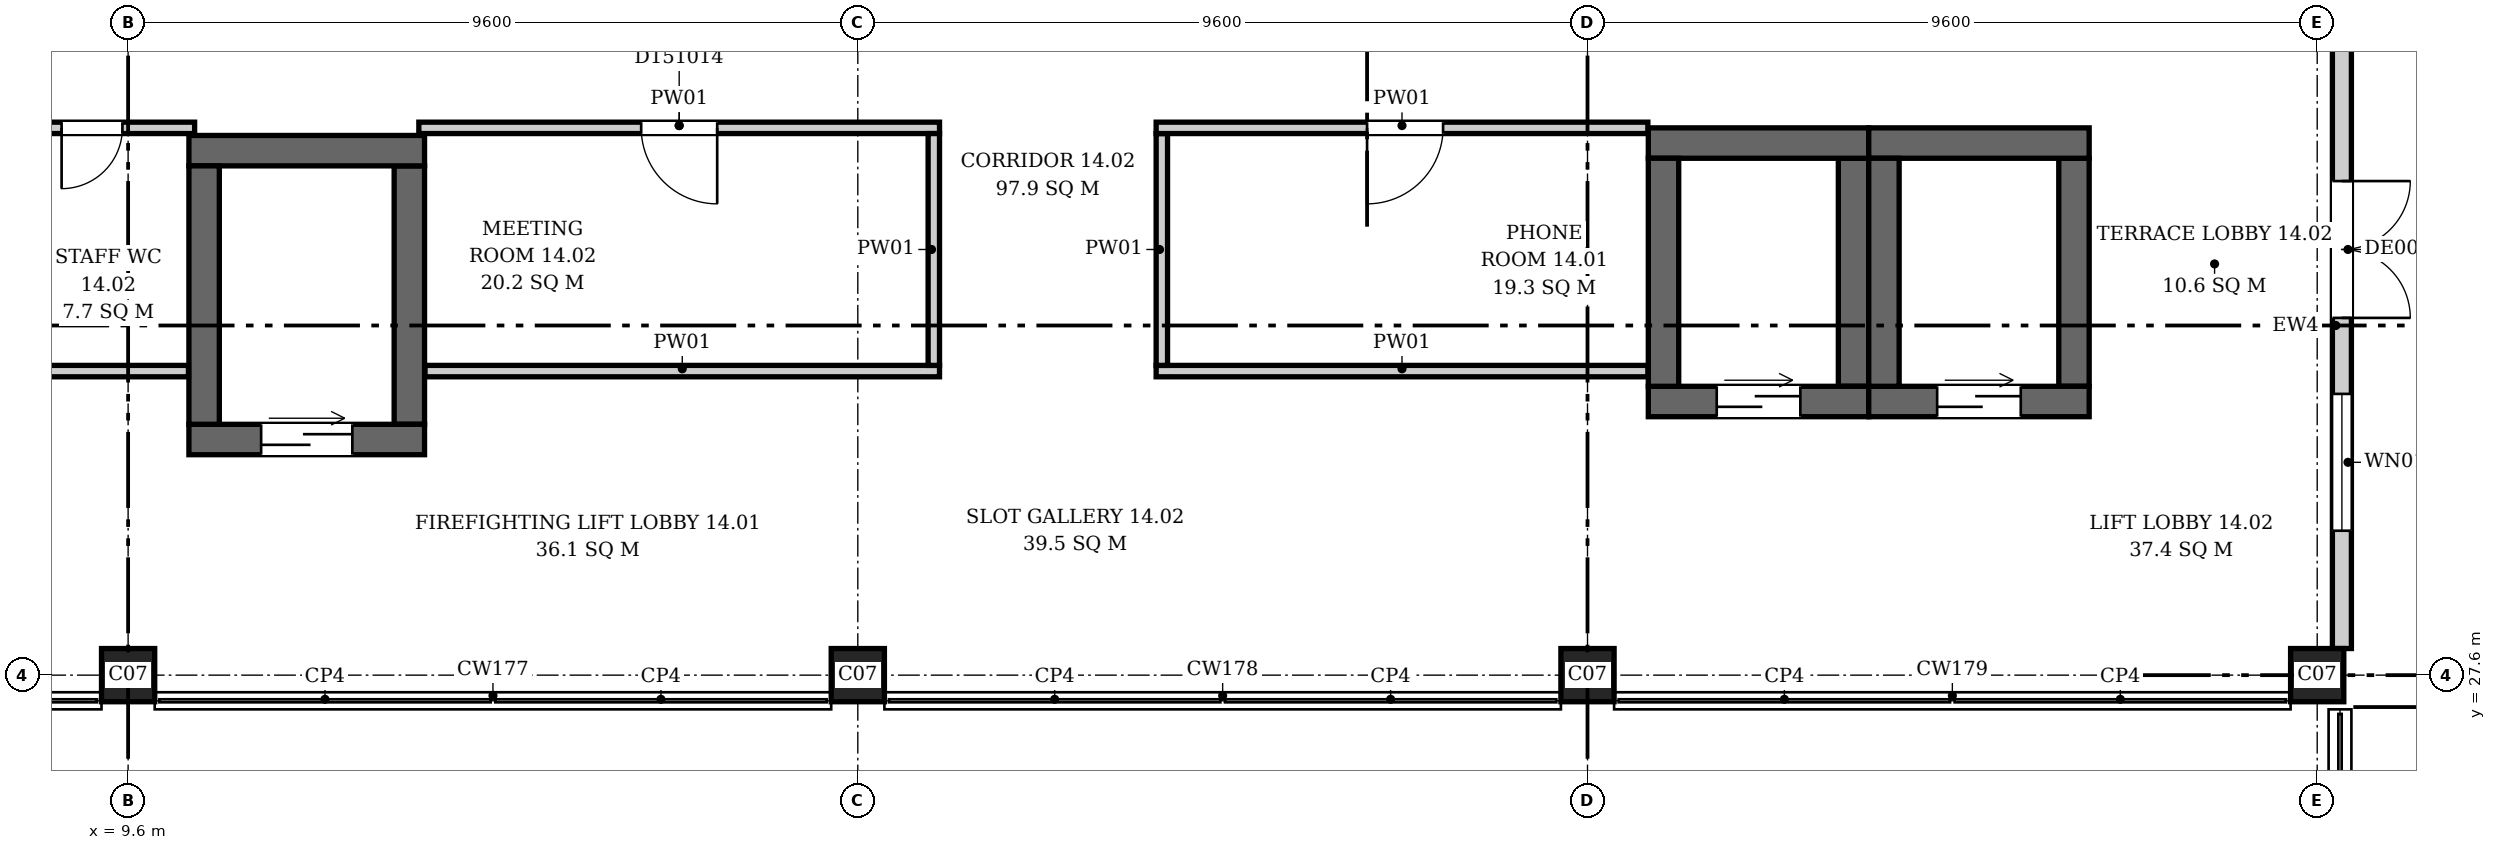
"""IFC4 building model, lengths in metres.
Left out: names, types, materials, properties, quantities, classifications, styles, units other than length and angle.
Written with IfcOpenShell. Run it as: python <this file> out.ifc"""

import sys

from ifc_helpers import new_model, si_unit, direction, frame, frame_2d, origin, origin_2d, place, context, subcontext, project, spatial, rectangle, extrude, element, fill, save


model = new_model("IFC4")
c1 = context("Model", 3, precision=1e-05, world=origin(), true_north=direction((0.0, 1.0)))
c2 = subcontext(c1, "Body", "Model", "MODEL_VIEW")
j1 = project(units=[si_unit("LENGTHUNIT", "METRE"), si_unit("PLANEANGLEUNIT", "RADIAN")], contexts=[c1])
p1 = place(None, origin())
s1 = spatial("IfcSite", under=j1, at=p1, CompositionType="ELEMENT")
p2 = place(p1, origin())
s2 = spatial("IfcBuilding", under=s1, at=p2, CompositionType="ELEMENT")
p3 = place(p2, frame((0.0, 0.0, 69.7)))
s3 = spatial("IfcBuildingStorey", under=s2, at=p3, CompositionType="ELEMENT", Elevation=69.7)
p4 = place(p3, frame((10.4, 30.7, 0.0), z_axis=(0.0, 0.0, 1.0), x_axis=(1.0, 0.0, 0.0)))
e1 = element("IfcWall", 1, at=p4, inside=s3, PredefinedType="SHEAR", context=c2, shape_type="SweptSolid", body=[
    extrude(rectangle(XDim=3.1, YDim=0.4, at=frame_2d((1.55, 0.0))), origin(), (0.0, 0.0, 1.0), 4.2),
])
p5 = place(p4, frame((0.95, 0.0, 0.0)))
e2 = element("IfcOpeningElement", 2, at=p5, cuts=e1, PredefinedType="OPENING", context=c2, shape_type="SweptSolid", body=[
    extrude(rectangle(XDim=1.2, YDim=2.1, at=frame_2d((0.6, 1.05))), frame((0.0, 0.21, 0.0), z_axis=(0.0, -1.0, 0.0), x_axis=(1.0, 0.0, 0.0)), (0.0, 0.0, 1.0), 0.42),
])
p6 = place(p3, frame((10.4, 34.5, 0.0), z_axis=(0.0, 0.0, 1.0), x_axis=(1.0, 0.0, 0.0)))
e3 = element("IfcWall", 3, at=p6, inside=s3, PredefinedType="SHEAR", context=c2, shape_type="SweptSolid", body=[
    extrude(rectangle(XDim=3.1, YDim=0.4, at=frame_2d((1.55, 0.0))), origin(), (0.0, 0.0, 1.0), 4.2),
])
for number, where, z_axis, x_axis in (
    (4, (10.6, 30.9, 0.0), (0.0, 0.0, 1.0), (0.0, 1.0, 0.0)),
    (5, (13.3, 30.9, 0.0), (0.0, 0.0, 1.0), (0.0, 1.0, 0.0)),
):
    element("IfcWall", number, at=place(p3, frame(where, z_axis=z_axis, x_axis=x_axis)), inside=s3, PredefinedType="SHEAR", context=c2, shape_type="SweptSolid", body=[
        extrude(rectangle(XDim=3.4, YDim=0.4, at=frame_2d((1.7, 0.0))), origin(), (0.0, 0.0, 1.0), 4.2),
    ])
p7 = place(p3, frame((29.6, 31.2, 0.0), z_axis=(0.0, 0.0, 1.0), x_axis=(1.0, 0.0, 0.0)))
e6 = element("IfcWall", 6, at=p7, inside=s3, PredefinedType="SHEAR", context=c2, shape_type="SweptSolid", body=[
    extrude(rectangle(XDim=2.9, YDim=0.4, at=frame_2d((1.45, 0.0))), origin(), (0.0, 0.0, 1.0), 4.2),
])
p8 = place(p7, frame((0.9, 0.0, 0.0)))
e7 = element("IfcOpeningElement", 7, at=p8, cuts=e6, PredefinedType="OPENING", context=c2, shape_type="SweptSolid", body=[
    extrude(rectangle(XDim=1.1, YDim=2.1, at=frame_2d((0.55, 1.05))), frame((0.0, 0.21, 0.0), z_axis=(0.0, -1.0, 0.0), x_axis=(1.0, 0.0, 0.0)), (0.0, 0.0, 1.0), 0.42),
])
p9 = place(p3, frame((29.6, 34.6, 0.0), z_axis=(0.0, 0.0, 1.0), x_axis=(1.0, 0.0, 0.0)))
e8 = element("IfcWall", 8, at=p9, inside=s3, PredefinedType="SHEAR", context=c2, shape_type="SweptSolid", body=[
    extrude(rectangle(XDim=2.9, YDim=0.4, at=frame_2d((1.45, 0.0))), origin(), (0.0, 0.0, 1.0), 4.2),
])
for number, where, z_axis, x_axis in (
    (9, (29.8, 31.4, 0.0), (0.0, 0.0, 1.0), (0.0, 1.0, 0.0)),
    (10, (32.3, 31.4, 0.0), (0.0, 0.0, 1.0), (0.0, 1.0, 0.0)),
):
    element("IfcWall", number, at=place(p3, frame(where, z_axis=z_axis, x_axis=x_axis)), inside=s3, PredefinedType="SHEAR", context=c2, shape_type="SweptSolid", body=[
        extrude(rectangle(XDim=3.0, YDim=0.4, at=frame_2d((1.5, 0.0))), origin(), (0.0, 0.0, 1.0), 4.2),
    ])
p10 = place(p3, frame((32.5, 31.2, 0.0), z_axis=(0.0, 0.0, 1.0), x_axis=(1.0, 0.0, 0.0)))
e11 = element("IfcWall", 11, at=p10, inside=s3, PredefinedType="SHEAR", context=c2, shape_type="SweptSolid", body=[
    extrude(rectangle(XDim=2.9, YDim=0.4, at=frame_2d((1.45, 0.0))), origin(), (0.0, 0.0, 1.0), 4.2),
])
p11 = place(p10, frame((0.9, 0.0, 0.0)))
e12 = element("IfcOpeningElement", 12, at=p11, cuts=e11, PredefinedType="OPENING", context=c2, shape_type="SweptSolid", body=[
    extrude(rectangle(XDim=1.1, YDim=2.1, at=frame_2d((0.55, 1.05))), frame((0.0, 0.21, 0.0), z_axis=(0.0, -1.0, 0.0), x_axis=(1.0, 0.0, 0.0)), (0.0, 0.0, 1.0), 0.42),
])
p12 = place(p3, frame((32.5, 34.6, 0.0), z_axis=(0.0, 0.0, 1.0), x_axis=(1.0, 0.0, 0.0)))
e13 = element("IfcWall", 13, at=p12, inside=s3, PredefinedType="SHEAR", context=c2, shape_type="SweptSolid", body=[
    extrude(rectangle(XDim=2.9, YDim=0.4, at=frame_2d((1.45, 0.0))), origin(), (0.0, 0.0, 1.0), 4.2),
])
for number, where, z_axis, x_axis in (
    (14, (32.7, 31.4, 0.0), (0.0, 0.0, 1.0), (0.0, 1.0, 0.0)),
    (15, (35.2, 31.4, 0.0), (0.0, 0.0, 1.0), (0.0, 1.0, 0.0)),
):
    element("IfcWall", number, at=place(p3, frame(where, z_axis=z_axis, x_axis=x_axis)), inside=s3, PredefinedType="SHEAR", context=c2, shape_type="SweptSolid", body=[
        extrude(rectangle(XDim=3.0, YDim=0.4, at=frame_2d((1.5, 0.0))), origin(), (0.0, 0.0, 1.0), 4.2),
    ])
for number, where, z_axis, x_axis in (
    (16, (9.6, 27.6, 0.0), (0.0, 0.0, 1.0), (1.0, 0.0, 0.0)),
    (17, (19.2, 27.6, 0.0), (0.0, 0.0, 1.0), (1.0, 0.0, 0.0)),
    (18, (28.8, 27.6, 0.0), (0.0, 0.0, 1.0), (1.0, 0.0, 0.0)),
    (19, (38.4, 27.6, 0.0), (0.0, 0.0, 1.0), (1.0, 0.0, 0.0)),
):
    element("IfcColumn", number, at=place(p3, frame(where, z_axis=z_axis, x_axis=x_axis)), inside=s3, PredefinedType="COLUMN", context=c2, shape_type="SweptSolid", body=[
        extrude(rectangle(XDim=0.7, YDim=0.7, at=origin_2d()), origin(), (0.0, 0.0, 1.0), 4.2),
    ])
p13 = place(p3, frame((38.725, 27.95, 0.0), z_axis=(0.0, 0.0, 1.0), x_axis=(0.0, 1.0, 0.0)))
e20 = element("IfcWall", 20, at=p13, inside=s3, PredefinedType="ELEMENTEDWALL", context=c2, shape_type="SweptSolid", body=[
    extrude(rectangle(XDim=8.5, YDim=0.25, at=frame_2d((4.25, 0.0))), origin(), (0.0, 0.0, 1.0), 3.9),
])
p14 = place(p13, frame((4.35, 0.0, 0.0)))
e21 = element("IfcOpeningElement", 21, at=p14, cuts=e20, PredefinedType="OPENING", context=c2, shape_type="SweptSolid", body=[
    extrude(rectangle(XDim=1.8, YDim=2.4, at=frame_2d((0.9, 1.2))), frame((0.0, 0.135, 0.0), z_axis=(0.0, -1.0, 0.0), x_axis=(1.0, 0.0, 0.0)), (0.0, 0.0, 1.0), 0.27),
])
p15 = place(p13, frame((1.55, 0.0, 0.9)))
e22 = element("IfcOpeningElement", 22, at=p15, cuts=e20, PredefinedType="OPENING", context=c2, shape_type="SweptSolid", body=[
    extrude(rectangle(XDim=1.8, YDim=2.6, at=frame_2d((0.9, 1.3))), frame((0.0, 0.135, 0.0), z_axis=(0.0, -1.0, 0.0), x_axis=(1.0, 0.0, 0.0)), (0.0, 0.0, 1.0), 0.27),
])
p16 = place(p3, frame((-0.044, 31.6, 0.0), z_axis=(0.0, 0.0, 1.0), x_axis=(1.0, 0.0, 0.0)))
e23 = element("IfcWall", 23, at=p16, inside=s3, PredefinedType="PARTITIONING", context=c2, shape_type="SweptSolid", body=[
    extrude(rectangle(XDim=10.438, YDim=0.15, at=frame_2d((5.219, 0.0))), origin(), (0.0, 0.0, 1.0), 3.9),
])
p17 = place(p3, frame((-0.044, 34.8, 0.0), z_axis=(0.0, 0.0, 1.0), x_axis=(1.0, 0.0, 0.0)))
e24 = element("IfcWall", 24, at=p17, inside=s3, PredefinedType="PARTITIONING", context=c2, shape_type="SweptSolid", body=[
    extrude(rectangle(XDim=10.519, YDim=0.15, at=frame_2d((5.26, 0.0))), origin(), (0.0, 0.0, 1.0), 3.9),
])
p18 = place(p17, frame((0.844, 0.0, 0.0)))
e25 = element("IfcOpeningElement", 25, at=p18, cuts=e24, PredefinedType="OPENING", context=c2, shape_type="SweptSolid", body=[
    extrude(rectangle(XDim=0.9, YDim=2.1, at=frame_2d((0.45, 1.05))), frame((0.0, 0.085, 0.0), z_axis=(0.0, -1.0, 0.0), x_axis=(1.0, 0.0, 0.0)), (0.0, 0.0, 1.0), 0.17),
])
p19 = place(p17, frame((3.469, 0.0, 0.0)))
e26 = element("IfcOpeningElement", 26, at=p19, cuts=e24, PredefinedType="OPENING", context=c2, shape_type="SweptSolid", body=[
    extrude(rectangle(XDim=0.8, YDim=2.1, at=frame_2d((0.4, 1.05))), frame((0.0, 0.085, 0.0), z_axis=(0.0, -1.0, 0.0), x_axis=(1.0, 0.0, 0.0)), (0.0, 0.0, 1.0), 0.17),
])
p20 = place(p17, frame((6.143, 0.0, 0.0)))
e27 = element("IfcOpeningElement", 27, at=p20, cuts=e24, PredefinedType="OPENING", context=c2, shape_type="SweptSolid", body=[
    extrude(rectangle(XDim=0.7, YDim=2.1, at=frame_2d((0.35, 1.05))), frame((0.0, 0.085, 0.0), z_axis=(0.0, -1.0, 0.0), x_axis=(1.0, 0.0, 0.0)), (0.0, 0.0, 1.0), 0.17),
])
p21 = place(p17, frame((8.769, 0.0, 0.0)))
e28 = element("IfcOpeningElement", 28, at=p21, cuts=e24, PredefinedType="OPENING", context=c2, shape_type="SweptSolid", body=[
    extrude(rectangle(XDim=0.8, YDim=2.1, at=frame_2d((0.4, 1.05))), frame((0.0, 0.085, 0.0), z_axis=(0.0, -1.0, 0.0), x_axis=(1.0, 0.0, 0.0)), (0.0, 0.0, 1.0), 0.17),
])
p22 = place(p3, frame((13.425, 34.8, 0.0), z_axis=(0.0, 0.0, 1.0), x_axis=(1.0, 0.0, 0.0)))
e29 = element("IfcWall", 29, at=p22, inside=s3, PredefinedType="PARTITIONING", context=c2, shape_type="SweptSolid", body=[
    extrude(rectangle(XDim=6.85, YDim=0.15, at=frame_2d((3.425, 0.0))), origin(), (0.0, 0.0, 1.0), 3.9),
])
p23 = place(p22, frame((2.925, 0.0, 0.0)))
e30 = element("IfcOpeningElement", 30, at=p23, cuts=e29, PredefinedType="OPENING", context=c2, shape_type="SweptSolid", body=[
    extrude(rectangle(XDim=1.0, YDim=2.1, at=frame_2d((0.5, 1.05))), frame((0.0, 0.085, 0.0), z_axis=(0.0, -1.0, 0.0), x_axis=(1.0, 0.0, 0.0)), (0.0, 0.0, 1.0), 0.17),
])
p24 = place(p3, frame((13.506, 31.6, 0.0), z_axis=(0.0, 0.0, 1.0), x_axis=(1.0, 0.0, 0.0)))
e31 = element("IfcWall", 31, at=p24, inside=s3, PredefinedType="PARTITIONING", context=c2, shape_type="SweptSolid", body=[
    extrude(rectangle(XDim=6.769, YDim=0.15, at=frame_2d((3.384, 0.0))), origin(), (0.0, 0.0, 1.0), 3.9),
])
p25 = place(p3, frame((20.2, 31.675, 0.0), z_axis=(0.0, 0.0, 1.0), x_axis=(0.0, 1.0, 0.0)))
e32 = element("IfcWall", 32, at=p25, inside=s3, PredefinedType="PARTITIONING", context=c2, shape_type="SweptSolid", body=[
    extrude(rectangle(XDim=3.05, YDim=0.15, at=frame_2d((1.525, 0.0))), origin(), (0.0, 0.0, 1.0), 3.9),
])
p26 = place(p3, frame((23.125, 31.6, 0.0), z_axis=(0.0, 0.0, 1.0), x_axis=(1.0, 0.0, 0.0)))
e33 = element("IfcWall", 33, at=p26, inside=s3, PredefinedType="PARTITIONING", context=c2, shape_type="SweptSolid", body=[
    extrude(rectangle(XDim=6.469, YDim=0.15, at=frame_2d((3.234, 0.0))), origin(), (0.0, 0.0, 1.0), 3.9),
])
p27 = place(p3, frame((23.2, 31.675, 0.0), z_axis=(0.0, 0.0, 1.0), x_axis=(0.0, 1.0, 0.0)))
e34 = element("IfcWall", 34, at=p27, inside=s3, PredefinedType="PARTITIONING", context=c2, shape_type="SweptSolid", body=[
    extrude(rectangle(XDim=3.05, YDim=0.15, at=frame_2d((1.525, 0.0))), origin(), (0.0, 0.0, 1.0), 3.9),
])
p28 = place(p3, frame((23.125, 34.8, 0.0), z_axis=(0.0, 0.0, 1.0), x_axis=(1.0, 0.0, 0.0)))
e35 = element("IfcWall", 35, at=p28, inside=s3, PredefinedType="PARTITIONING", context=c2, shape_type="SweptSolid", body=[
    extrude(rectangle(XDim=6.469, YDim=0.15, at=frame_2d((3.234, 0.0))), origin(), (0.0, 0.0, 1.0), 3.9),
])
p29 = place(p28, frame((2.775, 0.0, 0.0)))
e36 = element("IfcOpeningElement", 36, at=p29, cuts=e35, PredefinedType="OPENING", context=c2, shape_type="SweptSolid", body=[
    extrude(rectangle(XDim=1.0, YDim=2.1, at=frame_2d((0.5, 1.05))), frame((0.0, 0.085, 0.0), z_axis=(0.0, -1.0, 0.0), x_axis=(1.0, 0.0, 0.0)), (0.0, 0.0, 1.0), 0.17),
])
p30 = place(p14, frame((1.8, 0.0, 0.0), z_axis=(0.0, 0.0, 1.0), x_axis=(-1.0, 0.0, 0.0)))
e37 = element("IfcDoor", 37, at=p30, inside=s3, OperationType="DOUBLE_DOOR_SINGLE_SWING", PredefinedType="DOOR", context=c2, shape_type="SweptSolid", body=[
    extrude(rectangle(XDim=1.8, YDim=2.4, at=frame_2d((0.9, 1.2))), frame((0.0, 0.025, 0.0), z_axis=(0.0, -1.0, 0.0), x_axis=(1.0, 0.0, 0.0)), (0.0, 0.0, 1.0), 0.05),
])
fill(e21, e37)
p31 = place(p15, origin())
e38 = element("IfcWindow", 38, at=p31, inside=s3, PartitioningType="SINGLE_PANEL", PredefinedType="WINDOW", context=c2, shape_type="SweptSolid", body=[
    extrude(rectangle(XDim=1.8, YDim=2.6, at=frame_2d((0.9, 1.3))), frame((0.0, 0.03, 0.0), z_axis=(0.0, -1.0, 0.0), x_axis=(1.0, 0.0, 0.0)), (0.0, 0.0, 1.0), 0.06),
])
fill(e22, e38)
p32 = place(p5, origin())
e39 = element("IfcDoor", 39, at=p32, inside=s3, OperationType="DOUBLE_DOOR_SLIDING", PredefinedType="DOOR", context=c2, shape_type="SweptSolid", body=[
    extrude(rectangle(XDim=1.2, YDim=2.1, at=frame_2d((0.6, 1.05))), frame((0.0, 0.025, 0.0), z_axis=(0.0, -1.0, 0.0), x_axis=(1.0, 0.0, 0.0)), (0.0, 0.0, 1.0), 0.05),
])
fill(e2, e39)
p33 = place(p8, origin())
e40 = element("IfcDoor", 40, at=p33, inside=s3, OperationType="DOUBLE_DOOR_SLIDING", PredefinedType="DOOR", context=c2, shape_type="SweptSolid", body=[
    extrude(rectangle(XDim=1.1, YDim=2.1, at=frame_2d((0.55, 1.05))), frame((0.0, 0.025, 0.0), z_axis=(0.0, -1.0, 0.0), x_axis=(1.0, 0.0, 0.0)), (0.0, 0.0, 1.0), 0.05),
])
fill(e7, e40)
p34 = place(p11, origin())
e41 = element("IfcDoor", 41, at=p34, inside=s3, OperationType="DOUBLE_DOOR_SLIDING", PredefinedType="DOOR", context=c2, shape_type="SweptSolid", body=[
    extrude(rectangle(XDim=1.1, YDim=2.1, at=frame_2d((0.55, 1.05))), frame((0.0, 0.025, 0.0), z_axis=(0.0, -1.0, 0.0), x_axis=(1.0, 0.0, 0.0)), (0.0, 0.0, 1.0), 0.05),
])
fill(e12, e41)
p35 = place(p21, origin())
e42 = element("IfcDoor", 42, at=p35, inside=s3, OperationType="SINGLE_SWING_LEFT", PredefinedType="DOOR", context=c2, shape_type="SweptSolid", body=[
    extrude(rectangle(XDim=0.8, YDim=2.1, at=frame_2d((0.4, 1.05))), frame((0.0, 0.025, 0.0), z_axis=(0.0, -1.0, 0.0), x_axis=(1.0, 0.0, 0.0)), (0.0, 0.0, 1.0), 0.05),
])
fill(e28, e42)
p36 = place(p23, origin())
e43 = element("IfcDoor", 43, at=p36, inside=s3, OperationType="SINGLE_SWING_RIGHT", PredefinedType="DOOR", context=c2, shape_type="SweptSolid", body=[
    extrude(rectangle(XDim=1.0, YDim=2.1, at=frame_2d((0.5, 1.05))), frame((0.0, 0.025, 0.0), z_axis=(0.0, -1.0, 0.0), x_axis=(1.0, 0.0, 0.0)), (0.0, 0.0, 1.0), 0.05),
])
fill(e30, e43)
p37 = place(p29, origin())
e44 = element("IfcDoor", 44, at=p37, inside=s3, OperationType="SINGLE_SWING_LEFT", PredefinedType="DOOR", context=c2, shape_type="SweptSolid", body=[
    extrude(rectangle(XDim=1.0, YDim=2.1, at=frame_2d((0.5, 1.05))), frame((0.0, 0.025, 0.0), z_axis=(0.0, -1.0, 0.0), x_axis=(1.0, 0.0, 0.0)), (0.0, 0.0, 1.0), 0.05),
])
fill(e36, e44)
save(model, sys.argv[1])
